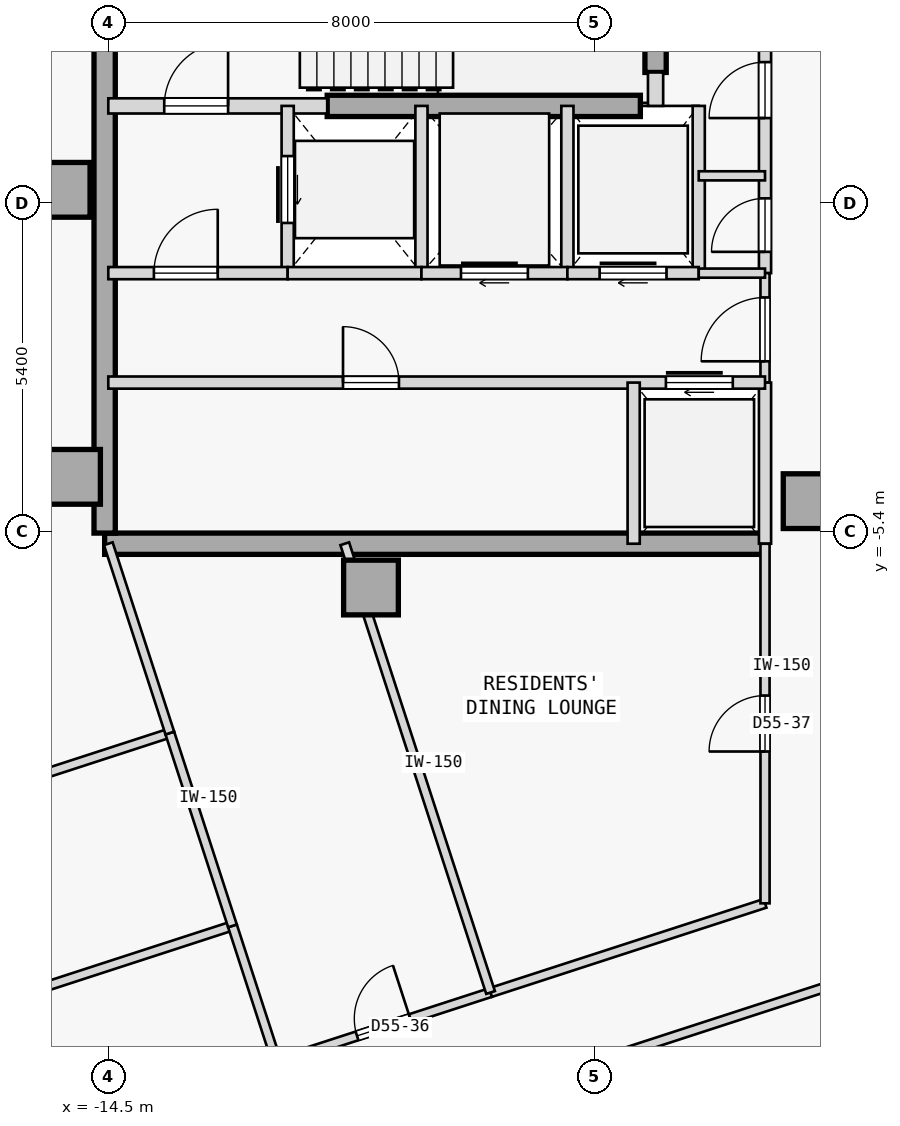
"""IFC4 building model, lengths in metres.
Left out: names, types, materials, properties, quantities, classifications, styles, units other than length and angle.
Written with IfcOpenShell. Run it as: python <this file> out.ifc"""

import sys

from ifc_helpers import new_model, si_unit, direction, frame, frame_2d, origin, origin_2d, place, context, subcontext, project, spatial, rectangle, extrude, element, fill, save


model = new_model("IFC4")
c1 = context("Model", 3, precision=1e-05, world=origin(), true_north=direction((0.0, 1.0)))
c2 = subcontext(c1, "Body", "Model", "MODEL_VIEW")
j1 = project(units=[si_unit("LENGTHUNIT", "METRE"), si_unit("PLANEANGLEUNIT", "RADIAN")], contexts=[c1])
p1 = place(None, origin())
s1 = spatial("IfcSite", under=j1, at=p1, CompositionType="ELEMENT")
p2 = place(p1, origin())
s2 = spatial("IfcBuilding", under=s1, at=p2, CompositionType="ELEMENT")
p3 = place(p2, frame((0.0, 0.0, 210.9)))
s3 = spatial("IfcBuildingStorey", under=s2, at=p3, CompositionType="ELEMENT", Elevation=210.9)
for number, where, z_axis, x_axis in (
    (1, (-15.25, 0.22, 0.0), (0.0, 0.0, 1.0), (1.0, 0.0, 0.0)),
    (2, (-15.08, -4.5, 0.0), (0.0, 0.0, 1.0), (1.0, 0.0, 0.0)),
    (3, (-10.18, -6.32, 0.0), (0.0, 0.0, 1.0), (1.0, 0.0, 0.0)),
    (4, (-2.95, -4.9, 0.0), (0.0, 0.0, 1.0), (1.0, 0.0, 0.0)),
):
    element("IfcColumn", number, at=place(p3, frame(where, z_axis=z_axis, x_axis=x_axis)), inside=s3, PredefinedType="COLUMN", context=c2, shape_type="SweptSolid", body=[
        extrude(rectangle(XDim=0.9, YDim=0.9, at=origin_2d()), origin(), (0.0, 0.0, 1.0), 3.35),
    ])
p4 = place(p3, frame((-14.56, -5.6, 0.0), z_axis=(0.0, 0.0, 1.0), x_axis=(1.0, 0.0, 0.0)))
e5 = element("IfcWall", 5, at=p4, inside=s3, PredefinedType="SHEAR", context=c2, shape_type="SweptSolid", body=[
    extrude(rectangle(XDim=10.86, YDim=0.35, at=frame_2d((5.43, 0.0))), origin(), (0.0, 0.0, 1.0), 3.125),
])
p5 = place(p3, frame((-14.56, -5.425, 0.0), z_axis=(0.0, 0.0, 1.0), x_axis=(0.0, 1.0, 0.0)))
e6 = element("IfcWall", 6, at=p5, inside=s3, PredefinedType="SHEAR", context=c2, shape_type="SweptSolid", body=[
    extrude(rectangle(XDim=10.85, YDim=0.35, at=frame_2d((5.425, 0.0))), origin(), (0.0, 0.0, 1.0), 3.125),
])
p6 = place(p3, frame((-5.5, 2.15, 0.0), z_axis=(0.0, 0.0, 1.0), x_axis=(0.0, 1.0, 0.0)))
e7 = element("IfcWall", 7, at=p6, inside=s3, PredefinedType="SHEAR", context=c2, shape_type="SweptSolid", body=[
    extrude(rectangle(XDim=3.275, YDim=0.35, at=frame_2d((1.638, 0.0))), origin(), (0.0, 0.0, 1.0), 3.125),
])
p7 = place(p3, frame((-10.9, 1.6, 0.0), z_axis=(0.0, 0.0, 1.0), x_axis=(1.0, 0.0, 0.0)))
e8 = element("IfcWall", 8, at=p7, inside=s3, PredefinedType="SHEAR", context=c2, shape_type="SweptSolid", body=[
    extrude(rectangle(XDim=5.15, YDim=0.35, at=frame_2d((2.575, 0.0))), origin(), (0.0, 0.0, 1.0), 3.125),
])
p8 = place(p3, frame((-14.5, 1.6, 0.0), z_axis=(0.0, 0.0, 1.0), x_axis=(1.0, 0.0, 0.0)))
e9 = element("IfcWall", 9, at=p8, inside=s3, PredefinedType="STANDARD", context=c2, shape_type="SweptSolid", body=[
    extrude(rectangle(XDim=3.6, YDim=0.25, at=frame_2d((1.8, 0.0))), origin(), (0.0, 0.0, 1.0), 3.125),
])
p9 = place(p8, frame((0.92, 0.0, 0.0)))
e10 = element("IfcOpeningElement", 10, at=p9, cuts=e9, PredefinedType="OPENING", context=c2, shape_type="SweptSolid", body=[
    extrude(rectangle(XDim=1.05, YDim=2.15, at=frame_2d((0.525, 1.075))), frame((0.0, 0.135, 0.0), z_axis=(0.0, -1.0, 0.0), x_axis=(1.0, 0.0, 0.0)), (0.0, 0.0, 1.0), 0.27),
])
p10 = place(p3, frame((-5.5, 1.6, 0.0), z_axis=(0.0, 0.0, 1.0), x_axis=(0.0, 1.0, 0.0)))
e11 = element("IfcWall", 11, at=p10, inside=s3, PredefinedType="STANDARD", context=c2, shape_type="SweptSolid", body=[
    extrude(rectangle(XDim=0.55, YDim=0.25, at=frame_2d((0.275, 0.0))), origin(), (0.0, 0.0, 1.0), 3.125),
])
p11 = place(p3, frame((-3.7, -1.15, 0.0), z_axis=(0.0, 0.0, 1.0), x_axis=(0.0, 1.0, 0.0)))
e12 = element("IfcWall", 12, at=p11, inside=s3, PredefinedType="STANDARD", context=c2, shape_type="SweptSolid", body=[
    extrude(rectangle(XDim=6.75, YDim=0.2, at=frame_2d((3.375, 0.0))), origin(), (0.0, 0.0, 1.0), 3.125),
])
p12 = place(p11, frame((0.35, 0.0, 0.0)))
e13 = element("IfcOpeningElement", 13, at=p12, cuts=e12, PredefinedType="OPENING", context=c2, shape_type="SweptSolid", body=[
    extrude(rectangle(XDim=0.88, YDim=2.15, at=frame_2d((0.44, 1.075))), frame((0.0, 0.11, 0.0), z_axis=(0.0, -1.0, 0.0), x_axis=(1.0, 0.0, 0.0)), (0.0, 0.0, 1.0), 0.22),
])
p13 = place(p11, frame((2.55, 0.0, 0.0)))
e14 = element("IfcOpeningElement", 14, at=p13, cuts=e12, PredefinedType="OPENING", context=c2, shape_type="SweptSolid", body=[
    extrude(rectangle(XDim=0.92, YDim=2.15, at=frame_2d((0.46, 1.075))), frame((0.0, 0.11, 0.0), z_axis=(0.0, -1.0, 0.0), x_axis=(1.0, 0.0, 0.0)), (0.0, 0.0, 1.0), 0.22),
])
p14 = place(p11, frame((4.22, 0.0, 0.0)))
e15 = element("IfcOpeningElement", 15, at=p14, cuts=e12, PredefinedType="OPENING", context=c2, shape_type="SweptSolid", body=[
    extrude(rectangle(XDim=0.88, YDim=2.15, at=frame_2d((0.44, 1.075))), frame((0.0, 0.11, 0.0), z_axis=(0.0, -1.0, 0.0), x_axis=(1.0, 0.0, 0.0)), (0.0, 0.0, 1.0), 0.22),
])
p15 = place(p3, frame((-3.7, -2.95, 0.0), z_axis=(0.0, 0.0, 1.0), x_axis=(0.0, 1.0, 0.0)))
e16 = element("IfcWall", 16, at=p15, inside=s3, PredefinedType="PARTITIONING", context=c2, shape_type="SweptSolid", body=[
    extrude(rectangle(XDim=1.8, YDim=0.15, at=frame_2d((0.9, 0.0))), origin(), (0.0, 0.0, 1.0), 3.125),
])
p16 = place(p15, frame((0.35, 0.0, 0.0)))
e17 = element("IfcOpeningElement", 17, at=p16, cuts=e16, PredefinedType="OPENING", context=c2, shape_type="SweptSolid", body=[
    extrude(rectangle(XDim=1.05, YDim=2.18, at=frame_2d((0.525, 1.09))), frame((0.0, 0.085, 0.0), z_axis=(0.0, -1.0, 0.0), x_axis=(1.0, 0.0, 0.0)), (0.0, 0.0, 1.0), 0.17),
])
p17 = place(p3, frame((-3.7, -5.6, 0.0), z_axis=(0.0, 0.0, 1.0), x_axis=(0.0, 1.0, 0.0)))
e18 = element("IfcWall", 18, at=p17, inside=s3, PredefinedType="STANDARD", context=c2, shape_type="SweptSolid", body=[
    extrude(rectangle(XDim=2.65, YDim=0.2, at=frame_2d((1.325, 0.0))), origin(), (0.0, 0.0, 1.0), 3.125),
])
p18 = place(p3, frame((-11.55, -1.15, 0.0), z_axis=(0.0, 0.0, 1.0), x_axis=(0.0, 1.0, 0.0)))
e19 = element("IfcWall", 19, at=p18, inside=s3, PredefinedType="STANDARD", context=c2, shape_type="SweptSolid", body=[
    extrude(rectangle(XDim=2.75, YDim=0.2, at=frame_2d((1.375, 0.0))), origin(), (0.0, 0.0, 1.0), 3.125),
])
p19 = place(p18, frame((0.825, 0.0, 0.0)))
e20 = element("IfcOpeningElement", 20, at=p19, cuts=e19, PredefinedType="OPENING", context=c2, shape_type="SweptSolid", body=[
    extrude(rectangle(XDim=1.1, YDim=2.15, at=frame_2d((0.55, 1.075))), frame((0.0, 0.11, 0.0), z_axis=(0.0, -1.0, 0.0), x_axis=(1.0, 0.0, 0.0)), (0.0, 0.0, 1.0), 0.22),
])
p20 = place(p3, frame((-9.35, -1.15, 0.0), z_axis=(0.0, 0.0, 1.0), x_axis=(0.0, 1.0, 0.0)))
e21 = element("IfcWall", 21, at=p20, inside=s3, PredefinedType="STANDARD", context=c2, shape_type="SweptSolid", body=[
    extrude(rectangle(XDim=2.75, YDim=0.2, at=frame_2d((1.375, 0.0))), origin(), (0.0, 0.0, 1.0), 3.125),
])
p21 = place(p3, frame((-14.5, -1.15, 0.0), z_axis=(0.0, 0.0, 1.0), x_axis=(1.0, 0.0, 0.0)))
e22 = element("IfcWall", 22, at=p21, inside=s3, PredefinedType="STANDARD", context=c2, shape_type="SweptSolid", body=[
    extrude(rectangle(XDim=2.95, YDim=0.2, at=frame_2d((1.475, 0.0))), origin(), (0.0, 0.0, 1.0), 3.125),
])
p22 = place(p21, frame((0.75, 0.0, 0.0)))
e23 = element("IfcOpeningElement", 23, at=p22, cuts=e22, PredefinedType="OPENING", context=c2, shape_type="SweptSolid", body=[
    extrude(rectangle(XDim=1.05, YDim=2.18, at=frame_2d((0.525, 1.09))), frame((0.0, 0.11, 0.0), z_axis=(0.0, -1.0, 0.0), x_axis=(1.0, 0.0, 0.0)), (0.0, 0.0, 1.0), 0.22),
])
p23 = place(p3, frame((-11.55, -1.15, 0.0), z_axis=(0.0, 0.0, 1.0), x_axis=(1.0, 0.0, 0.0)))
e24 = element("IfcWall", 24, at=p23, inside=s3, PredefinedType="STANDARD", context=c2, shape_type="SweptSolid", body=[
    extrude(rectangle(XDim=2.2, YDim=0.2, at=frame_2d((1.1, 0.0))), origin(), (0.0, 0.0, 1.0), 3.125),
])
p24 = place(p3, frame((-6.95, -1.15, 0.0), z_axis=(0.0, 0.0, 1.0), x_axis=(0.0, 1.0, 0.0)))
e25 = element("IfcWall", 25, at=p24, inside=s3, PredefinedType="STANDARD", context=c2, shape_type="SweptSolid", body=[
    extrude(rectangle(XDim=2.75, YDim=0.2, at=frame_2d((1.375, 0.0))), origin(), (0.0, 0.0, 1.0), 3.125),
])
p25 = place(p3, frame((-9.35, -1.15, 0.0), z_axis=(0.0, 0.0, 1.0), x_axis=(1.0, 0.0, 0.0)))
e26 = element("IfcWall", 26, at=p25, inside=s3, PredefinedType="STANDARD", context=c2, shape_type="SweptSolid", body=[
    extrude(rectangle(XDim=2.4, YDim=0.2, at=frame_2d((1.2, 0.0))), origin(), (0.0, 0.0, 1.0), 3.125),
])
p26 = place(p25, frame((0.65, 0.0, 0.0)))
e27 = element("IfcOpeningElement", 27, at=p26, cuts=e26, PredefinedType="OPENING", context=c2, shape_type="SweptSolid", body=[
    extrude(rectangle(XDim=1.1, YDim=2.15, at=frame_2d((0.55, 1.075))), frame((0.0, 0.11, 0.0), z_axis=(0.0, -1.0, 0.0), x_axis=(1.0, 0.0, 0.0)), (0.0, 0.0, 1.0), 0.22),
])
p27 = place(p3, frame((-4.79, -1.15, 0.0), z_axis=(0.0, 0.0, 1.0), x_axis=(0.0, 1.0, 0.0)))
e28 = element("IfcWall", 28, at=p27, inside=s3, PredefinedType="STANDARD", context=c2, shape_type="SweptSolid", body=[
    extrude(rectangle(XDim=2.75, YDim=0.2, at=frame_2d((1.375, 0.0))), origin(), (0.0, 0.0, 1.0), 3.125),
])
p28 = place(p3, frame((-6.95, -1.15, 0.0), z_axis=(0.0, 0.0, 1.0), x_axis=(1.0, 0.0, 0.0)))
e29 = element("IfcWall", 29, at=p28, inside=s3, PredefinedType="STANDARD", context=c2, shape_type="SweptSolid", body=[
    extrude(rectangle(XDim=2.16, YDim=0.2, at=frame_2d((1.08, 0.0))), origin(), (0.0, 0.0, 1.0), 3.125),
])
p29 = place(p28, frame((0.53, 0.0, 0.0)))
e30 = element("IfcOpeningElement", 30, at=p29, cuts=e29, PredefinedType="OPENING", context=c2, shape_type="SweptSolid", body=[
    extrude(rectangle(XDim=1.1, YDim=2.15, at=frame_2d((0.55, 1.075))), frame((0.0, 0.11, 0.0), z_axis=(0.0, -1.0, 0.0), x_axis=(1.0, 0.0, 0.0)), (0.0, 0.0, 1.0), 0.22),
])
p30 = place(p3, frame((-4.79, -1.15, 0.0), z_axis=(0.0, 0.0, 1.0), x_axis=(1.0, 0.0, 0.0)))
e31 = element("IfcWall", 31, at=p30, inside=s3, PredefinedType="PARTITIONING", context=c2, shape_type="SweptSolid", body=[
    extrude(rectangle(XDim=1.09, YDim=0.15, at=frame_2d((0.545, 0.0))), origin(), (0.0, 0.0, 1.0), 3.125),
])
p31 = place(p3, frame((-14.5, -2.95, 0.0), z_axis=(0.0, 0.0, 1.0), x_axis=(1.0, 0.0, 0.0)))
e32 = element("IfcWall", 32, at=p31, inside=s3, PredefinedType="STANDARD", context=c2, shape_type="SweptSolid", body=[
    extrude(rectangle(XDim=10.8, YDim=0.2, at=frame_2d((5.4, 0.0))), origin(), (0.0, 0.0, 1.0), 3.125),
])
p32 = place(p31, frame((9.17, 0.0, 0.0)))
e33 = element("IfcOpeningElement", 33, at=p32, cuts=e32, PredefinedType="OPENING", context=c2, shape_type="SweptSolid", body=[
    extrude(rectangle(XDim=1.1, YDim=2.15, at=frame_2d((0.55, 1.075))), frame((0.0, 0.11, 0.0), z_axis=(0.0, -1.0, 0.0), x_axis=(1.0, 0.0, 0.0)), (0.0, 0.0, 1.0), 0.22),
])
p33 = place(p31, frame((3.86, 0.0, 0.0)))
e34 = element("IfcOpeningElement", 34, at=p33, cuts=e32, PredefinedType="OPENING", context=c2, shape_type="SweptSolid", body=[
    extrude(rectangle(XDim=0.92, YDim=2.15, at=frame_2d((0.46, 1.075))), frame((0.0, 0.11, 0.0), z_axis=(0.0, -1.0, 0.0), x_axis=(1.0, 0.0, 0.0)), (0.0, 0.0, 1.0), 0.22),
])
p34 = place(p3, frame((-5.86, -5.6, 0.0), z_axis=(0.0, 0.0, 1.0), x_axis=(0.0, 1.0, 0.0)))
e35 = element("IfcWall", 35, at=p34, inside=s3, PredefinedType="STANDARD", context=c2, shape_type="SweptSolid", body=[
    extrude(rectangle(XDim=2.65, YDim=0.2, at=frame_2d((1.325, 0.0))), origin(), (0.0, 0.0, 1.0), 3.125),
])
p35 = place(p3, frame((-4.79, 0.45, 0.0), z_axis=(0.0, 0.0, 1.0), x_axis=(1.0, 0.0, 0.0)))
e36 = element("IfcWall", 36, at=p35, inside=s3, PredefinedType="PARTITIONING", context=c2, shape_type="SweptSolid", body=[
    extrude(rectangle(XDim=1.09, YDim=0.15, at=frame_2d((0.545, 0.0))), origin(), (0.0, 0.0, 1.0), 3.125),
])
p36 = place(p3, frame((-16.482, -17.37, 0.0), z_axis=(0.0, 0.0, 1.0), x_axis=(0.9510563751, 0.309017428929, 0.0)))
e37 = element("IfcWall", 37, at=p36, inside=s3, PredefinedType="PARTITIONING", context=c2, shape_type="SweptSolid", body=[
    extrude(rectangle(XDim=15.602, YDim=0.15, at=frame_2d((7.801, 0.0))), origin(), (0.0, 0.0, 1.0), 3.125),
])
p37 = place(p36, frame((7.326, 0.0, 0.0)))
e38 = element("IfcOpeningElement", 38, at=p37, cuts=e37, PredefinedType="OPENING", context=c2, shape_type="SweptSolid", body=[
    extrude(rectangle(XDim=0.95, YDim=2.15, at=frame_2d((0.475, 1.075))), frame((0.0, 0.085, 0.0), z_axis=(0.0, -1.0, 0.0), x_axis=(1.0, 0.0, 0.0)), (0.0, 0.0, 1.0), 0.17),
])
p38 = place(p3, frame((-11.73, -14.123, 0.0), z_axis=(0.0, 0.0, 1.0), x_axis=(0.951052502763, 0.309029346483, 0.0)))
e39 = element("IfcWall", 39, at=p38, inside=s3, PredefinedType="PARTITIONING", context=c2, shape_type="SweptSolid", body=[
    extrude(rectangle(XDim=3.698, YDim=0.15, at=frame_2d((1.849, 0.0))), origin(), (0.0, 0.0, 1.0), 3.125),
])
p39 = place(p38, frame((1.389, 0.0, 0.0)))
e40 = element("IfcOpeningElement", 40, at=p39, cuts=e39, PredefinedType="OPENING", context=c2, shape_type="SweptSolid", body=[
    extrude(rectangle(XDim=0.92, YDim=2.15, at=frame_2d((0.46, 1.075))), frame((0.0, 0.085, 0.0), z_axis=(0.0, -1.0, 0.0), x_axis=(1.0, 0.0, 0.0)), (0.0, 0.0, 1.0), 0.17),
])
p40 = place(p3, frame((-8.213, -12.98, 0.0), z_axis=(0.0, 0.0, 1.0), x_axis=(0.951058260096, 0.309011627456, 0.0)))
e41 = element("IfcWall", 41, at=p40, inside=s3, PredefinedType="PARTITIONING", context=c2, shape_type="SweptSolid", body=[
    extrude(rectangle(XDim=4.746, YDim=0.15, at=frame_2d((2.373, 0.0))), origin(), (0.0, 0.0, 1.0), 3.125),
])
p41 = place(p3, frame((-3.7, -11.514, 0.0), z_axis=(0.0, 0.0, 1.0), x_axis=(-8.2572974e-05, 0.999999996591, 0.0)))
e42 = element("IfcWall", 42, at=p41, inside=s3, PredefinedType="PARTITIONING", context=c2, shape_type="SweptSolid", body=[
    extrude(rectangle(XDim=5.913, YDim=0.15, at=frame_2d((2.957, 0.0))), origin(), (0.0, 0.0, 1.0), 3.125),
])
p42 = place(p41, frame((2.497, 0.0, 0.0)))
e43 = element("IfcOpeningElement", 43, at=p42, cuts=e42, PredefinedType="OPENING", context=c2, shape_type="SweptSolid", body=[
    extrude(rectangle(XDim=0.92, YDim=2.15, at=frame_2d((0.46, 1.075))), frame((0.0, 0.085, 0.0), z_axis=(0.0, -1.0, 0.0), x_axis=(1.0, 0.0, 0.0)), (0.0, 0.0, 1.0), 0.17),
])
p43 = place(p3, frame((-30.178, -17.642, 0.0), z_axis=(0.0, 0.0, 1.0), x_axis=(0.95105650271, 0.309017036186, 0.0)))
e44 = element("IfcWall", 44, at=p43, inside=s3, PredefinedType="PARTITIONING", context=c2, shape_type="SweptSolid", body=[
    extrude(rectangle(XDim=18.632, YDim=0.15, at=frame_2d((9.316, 0.0))), origin(), (0.0, 0.0, 1.0), 3.125),
])
p44 = place(p43, frame((8.856, 0.0, 0.0)))
e45 = element("IfcOpeningElement", 45, at=p44, cuts=e44, PredefinedType="OPENING", context=c2, shape_type="SweptSolid", body=[
    extrude(rectangle(XDim=0.92, YDim=2.15, at=frame_2d((0.46, 1.075))), frame((0.0, 0.085, 0.0), z_axis=(0.0, -1.0, 0.0), x_axis=(1.0, 0.0, 0.0)), (0.0, 0.0, 1.0), 0.17),
])
p45 = place(p3, frame((-11.73, -14.123, 0.0), z_axis=(0.0, 0.0, 1.0), x_axis=(-0.309062621189, 0.951041690035, 0.0)))
e46 = element("IfcWall", 46, at=p45, inside=s3, PredefinedType="PARTITIONING", context=c2, shape_type="SweptSolid", body=[
    extrude(rectangle(XDim=2.354, YDim=0.15, at=frame_2d((1.177, 0.0))), origin(), (0.0, 0.0, 1.0), 3.125),
])
p46 = place(p3, frame((-31.208, -14.471, 0.0), z_axis=(0.0, 0.0, 1.0), x_axis=(0.951057753948, 0.309013185244, 0.0)))
e47 = element("IfcWall", 47, at=p46, inside=s3, PredefinedType="PARTITIONING", context=c2, shape_type="SweptSolid", body=[
    extrude(rectangle(XDim=18.632, YDim=0.15, at=frame_2d((9.316, 0.0))), origin(), (0.0, 0.0, 1.0), 3.125),
])
p47 = place(p3, frame((-12.458, -11.884, 0.0), z_axis=(0.0, 0.0, 1.0), x_axis=(-0.308946982245, 0.951079261766, 0.0)))
e48 = element("IfcWall", 48, at=p47, inside=s3, PredefinedType="PARTITIONING", context=c2, shape_type="SweptSolid", body=[
    extrude(rectangle(XDim=3.334, YDim=0.15, at=frame_2d((1.667, 0.0))), origin(), (0.0, 0.0, 1.0), 3.125),
])
p48 = place(p3, frame((-30.663, -9.757, 0.0), z_axis=(0.0, 0.0, 1.0), x_axis=(0.951058192995, 0.309011833974, 0.0)))
e49 = element("IfcWall", 49, at=p48, inside=s3, PredefinedType="PARTITIONING", context=c2, shape_type="SweptSolid", body=[
    extrude(rectangle(XDim=16.657, YDim=0.15, at=frame_2d((8.329, 0.0))), origin(), (0.0, 0.0, 1.0), 3.125),
])
p49 = place(p3, frame((-13.488, -8.713, 0.0), z_axis=(0.0, 0.0, 1.0), x_axis=(-0.309082700143, 0.951035164687, 0.0)))
e50 = element("IfcWall", 50, at=p49, inside=s3, PredefinedType="PARTITIONING", context=c2, shape_type="SweptSolid", body=[
    extrude(rectangle(XDim=3.274, YDim=0.15, at=frame_2d((1.637, 0.0))), origin(), (0.0, 0.0, 1.0), 3.125),
])
p50 = place(p3, frame((-8.213, -12.98, 0.0), z_axis=(0.0, 0.0, 1.0), x_axis=(-0.309017065592, 0.951056493155, 0.0)))
e51 = element("IfcWall", 51, at=p50, inside=s3, PredefinedType="PARTITIONING", context=c2, shape_type="SweptSolid", body=[
    extrude(rectangle(XDim=7.76, YDim=0.15, at=frame_2d((3.88, 0.0))), origin(), (0.0, 0.0, 1.0), 3.125),
])
p51 = place(p9, origin())
e52 = element("IfcDoor", 52, at=p51, inside=s3, OperationType="SINGLE_SWING_RIGHT", PredefinedType="DOOR", context=c2, shape_type="SweptSolid", body=[
    extrude(rectangle(XDim=1.05, YDim=2.15, at=frame_2d((0.525, 1.075))), frame((0.0, 0.025, 0.0), z_axis=(0.0, -1.0, 0.0), x_axis=(1.0, 0.0, 0.0)), (0.0, 0.0, 1.0), 0.05),
])
fill(e10, e52)
p52 = place(p22, origin())
e53 = element("IfcDoor", 53, at=p52, inside=s3, OperationType="SINGLE_SWING_RIGHT", PredefinedType="DOOR", context=c2, shape_type="SweptSolid", body=[
    extrude(rectangle(XDim=1.05, YDim=2.18, at=frame_2d((0.525, 1.09))), frame((0.0, 0.025, 0.0), z_axis=(0.0, -1.0, 0.0), x_axis=(1.0, 0.0, 0.0)), (0.0, 0.0, 1.0), 0.05),
])
fill(e23, e53)
p53 = place(p16, origin())
e54 = element("IfcDoor", 54, at=p53, inside=s3, OperationType="SINGLE_SWING_LEFT", PredefinedType="DOOR", context=c2, shape_type="SweptSolid", body=[
    extrude(rectangle(XDim=1.05, YDim=2.18, at=frame_2d((0.525, 1.09))), frame((0.0, 0.025, 0.0), z_axis=(0.0, -1.0, 0.0), x_axis=(1.0, 0.0, 0.0)), (0.0, 0.0, 1.0), 0.05),
])
fill(e17, e54)
p54 = place(p19, origin())
e55 = element("IfcDoor", 55, at=p54, inside=s3, OperationType="SLIDING_TO_RIGHT", PredefinedType="DOOR", context=c2, shape_type="SweptSolid", body=[
    extrude(rectangle(XDim=1.1, YDim=2.15, at=frame_2d((0.55, 1.075))), frame((0.0, 0.025, 0.0), z_axis=(0.0, -1.0, 0.0), x_axis=(1.0, 0.0, 0.0)), (0.0, 0.0, 1.0), 0.05),
])
fill(e20, e55)
p55 = place(p26, origin())
e56 = element("IfcDoor", 56, at=p55, inside=s3, OperationType="SLIDING_TO_RIGHT", PredefinedType="DOOR", context=c2, shape_type="SweptSolid", body=[
    extrude(rectangle(XDim=1.1, YDim=2.15, at=frame_2d((0.55, 1.075))), frame((0.0, 0.025, 0.0), z_axis=(0.0, -1.0, 0.0), x_axis=(1.0, 0.0, 0.0)), (0.0, 0.0, 1.0), 0.05),
])
fill(e27, e56)
p56 = place(p29, origin())
e57 = element("IfcDoor", 57, at=p56, inside=s3, OperationType="SLIDING_TO_RIGHT", PredefinedType="DOOR", context=c2, shape_type="SweptSolid", body=[
    extrude(rectangle(XDim=1.1, YDim=2.15, at=frame_2d((0.55, 1.075))), frame((0.0, 0.025, 0.0), z_axis=(0.0, -1.0, 0.0), x_axis=(1.0, 0.0, 0.0)), (0.0, 0.0, 1.0), 0.05),
])
fill(e30, e57)
p57 = place(p32, origin())
e58 = element("IfcDoor", 58, at=p57, inside=s3, OperationType="SLIDING_TO_RIGHT", PredefinedType="DOOR", context=c2, shape_type="SweptSolid", body=[
    extrude(rectangle(XDim=1.1, YDim=2.15, at=frame_2d((0.55, 1.075))), frame((0.0, 0.025, 0.0), z_axis=(0.0, -1.0, 0.0), x_axis=(1.0, 0.0, 0.0)), (0.0, 0.0, 1.0), 0.05),
])
fill(e33, e58)
p58 = place(p33, origin())
e59 = element("IfcDoor", 59, at=p58, inside=s3, OperationType="SINGLE_SWING_LEFT", PredefinedType="DOOR", context=c2, shape_type="SweptSolid", body=[
    extrude(rectangle(XDim=0.92, YDim=2.15, at=frame_2d((0.46, 1.075))), frame((0.0, 0.025, 0.0), z_axis=(0.0, -1.0, 0.0), x_axis=(1.0, 0.0, 0.0)), (0.0, 0.0, 1.0), 0.05),
])
fill(e34, e59)
p59 = place(p12, origin())
e60 = element("IfcDoor", 60, at=p59, inside=s3, OperationType="SINGLE_SWING_LEFT", PredefinedType="DOOR", context=c2, shape_type="SweptSolid", body=[
    extrude(rectangle(XDim=0.88, YDim=2.15, at=frame_2d((0.44, 1.075))), frame((0.0, 0.025, 0.0), z_axis=(0.0, -1.0, 0.0), x_axis=(1.0, 0.0, 0.0)), (0.0, 0.0, 1.0), 0.05),
])
fill(e13, e60)
p60 = place(p13, origin())
e61 = element("IfcDoor", 61, at=p60, inside=s3, OperationType="SINGLE_SWING_LEFT", PredefinedType="DOOR", context=c2, shape_type="SweptSolid", body=[
    extrude(rectangle(XDim=0.92, YDim=2.15, at=frame_2d((0.46, 1.075))), frame((0.0, 0.025, 0.0), z_axis=(0.0, -1.0, 0.0), x_axis=(1.0, 0.0, 0.0)), (0.0, 0.0, 1.0), 0.05),
])
fill(e14, e61)
p61 = place(p39, origin())
e62 = element("IfcDoor", 62, at=p61, inside=s3, OperationType="SINGLE_SWING_RIGHT", PredefinedType="DOOR", context=c2, shape_type="SweptSolid", body=[
    extrude(rectangle(XDim=0.92, YDim=2.15, at=frame_2d((0.46, 1.075))), frame((0.0, 0.025, 0.0), z_axis=(0.0, -1.0, 0.0), x_axis=(1.0, 0.0, 0.0)), (0.0, 0.0, 1.0), 0.05),
])
fill(e40, e62)
p62 = place(p42, origin())
e63 = element("IfcDoor", 63, at=p62, inside=s3, OperationType="SINGLE_SWING_LEFT", PredefinedType="DOOR", context=c2, shape_type="SweptSolid", body=[
    extrude(rectangle(XDim=0.92, YDim=2.15, at=frame_2d((0.46, 1.075))), frame((0.0, 0.025, 0.0), z_axis=(0.0, -1.0, 0.0), x_axis=(1.0, 0.0, 0.0)), (0.0, 0.0, 1.0), 0.05),
])
fill(e43, e63)
save(model, sys.argv[1])
